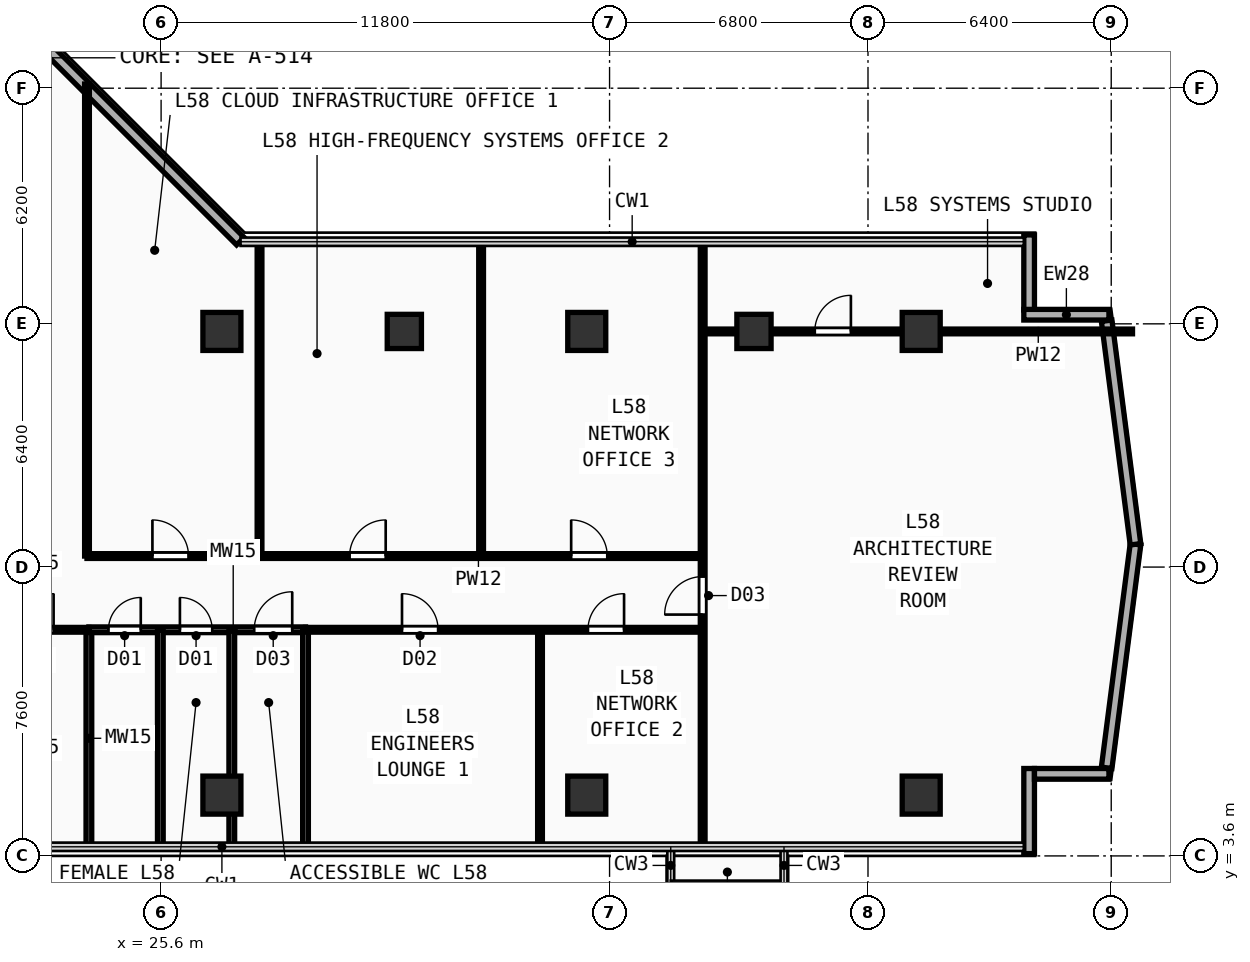
"""IFC4 building model, lengths in metres.
Left out: names, types, materials, properties, quantities, classifications, styles, units other than length and angle.
Written with IfcOpenShell. Run it as: python <this file> out.ifc"""

import sys

from ifc_helpers import new_model, si_unit, direction, frame, frame_2d, origin, origin_2d, place, context, subcontext, project, spatial, rectangle, extrude, element, fill, save


model = new_model("IFC4")
c1 = context("Model", 3, precision=1e-05, world=origin(), true_north=direction((0.0, 1.0)))
c2 = subcontext(c1, "Body", "Model", "MODEL_VIEW")
j1 = project(units=[si_unit("LENGTHUNIT", "METRE"), si_unit("PLANEANGLEUNIT", "RADIAN")], contexts=[c1])
p1 = place(None, origin())
s1 = spatial("IfcSite", under=j1, at=p1, CompositionType="ELEMENT")
p2 = place(p1, origin())
s2 = spatial("IfcBuilding", under=s1, at=p2, CompositionType="ELEMENT")
p3 = place(p2, frame((0.0, 0.0, 227.3)))
s3 = spatial("IfcBuildingStorey", under=s2, at=p3, CompositionType="ELEMENT", Elevation=227.3)
for number, where, z_axis, x_axis in (
    (1, (27.2, 5.2, 0.0), (0.0, 0.0, 1.0), (1.0, 0.0, 0.0)),
    (2, (36.8, 5.2, 0.0), (0.0, 0.0, 1.0), (1.0, 0.0, 0.0)),
    (3, (45.6, 5.2, 0.0), (0.0, 0.0, 1.0), (1.0, 0.0, 0.0)),
    (4, (27.2, 17.4, 0.0), (0.0, 0.0, 1.0), (1.0, 0.0, 0.0)),
    (5, (36.8, 17.4, 0.0), (0.0, 0.0, 1.0), (1.0, 0.0, 0.0)),
    (6, (45.6, 17.4, 0.0), (0.0, 0.0, 1.0), (1.0, 0.0, 0.0)),
):
    element("IfcColumn", number, at=place(p3, frame(where, z_axis=z_axis, x_axis=x_axis)), inside=s3, PredefinedType="COLUMN", context=c2, shape_type="SweptSolid", body=[
        extrude(rectangle(XDim=1.0, YDim=1.0, at=origin_2d()), origin(), (0.0, 0.0, 1.0), 3.56),
    ])
for number, where, z_axis, x_axis in (
    (7, (32.0, 17.4, 0.0), (0.0, 0.0, 1.0), (1.0, 0.0, 0.0)),
    (8, (41.2, 17.4, 0.0), (0.0, 0.0, 1.0), (1.0, 0.0, 0.0)),
):
    element("IfcColumn", number, at=place(p3, frame(where, z_axis=z_axis, x_axis=x_axis)), inside=s3, PredefinedType="COLUMN", context=c2, shape_type="SweptSolid", body=[
        extrude(rectangle(XDim=0.9, YDim=0.9, at=origin_2d()), origin(), (0.0, 0.0, 1.0), 3.56),
    ])
p4 = place(p3, frame((48.44, 3.66, 0.0), z_axis=(0.0, 0.0, 1.0), x_axis=(0.0, 1.0, 0.0)))
e9 = element("IfcWall", 9, at=p4, inside=s3, PredefinedType="SOLIDWALL", context=c2, shape_type="SweptSolid", body=[
    extrude(rectangle(XDim=2.24, YDim=0.28, at=frame_2d((1.12, 0.0))), origin(), (0.0, 0.0, 1.0), 3.56),
])
p5 = place(p3, frame((48.58, 5.76, 0.0), z_axis=(0.0, 0.0, 1.0), x_axis=(1.0, 0.0, 0.0)))
e10 = element("IfcWall", 10, at=p5, inside=s3, PredefinedType="SOLIDWALL", context=c2, shape_type="SweptSolid", body=[
    extrude(rectangle(XDim=1.96, YDim=0.28, at=frame_2d((0.98, 0.0))), origin(), (0.0, 0.0, 1.0), 3.56),
])
p6 = place(p3, frame((48.44, 17.965, 0.0), z_axis=(0.0, 0.0, 1.0), x_axis=(0.0, 1.0, 0.0)))
e11 = element("IfcWall", 11, at=p6, inside=s3, PredefinedType="SOLIDWALL", context=c2, shape_type="SweptSolid", body=[
    extrude(rectangle(XDim=1.975, YDim=0.28, at=frame_2d((0.987, 0.0))), origin(), (0.0, 0.0, 1.0), 3.56),
])
p7 = place(p3, frame((48.3, 17.84, 0.0), z_axis=(0.0, 0.0, 1.0), x_axis=(1.0, 0.0, 0.0)))
e12 = element("IfcWall", 12, at=p7, inside=s3, PredefinedType="SOLIDWALL", context=c2, shape_type="SweptSolid", body=[
    extrude(rectangle(XDim=2.24, YDim=0.28, at=frame_2d((1.12, 0.0))), origin(), (0.0, 0.0, 1.0), 3.56),
])
p8 = place(p3, frame((27.685, 19.775, 0.0), z_axis=(0.0, 0.0, 1.0), x_axis=(-0.707106781187, 0.707106781187, 0.0)))
e13 = element("IfcWall", 13, at=p8, inside=s3, PredefinedType="SOLIDWALL", context=c2, shape_type="SweptSolid", body=[
    extrude(rectangle(XDim=9.207, YDim=0.28, at=frame_2d((4.603, 0.0))), origin(), (0.0, 0.0, 1.0), 3.56),
])
for number, where, z_axis, x_axis in (
    (14, (50.48, 5.918, 0.0), (0.0, 0.0, 1.0), (0.128, 0.992, 0.0)),
    (15, (51.239, 11.799, 0.0), (0.0, 0.0, 1.0), (-0.128, 0.992, 0.0)),
):
    element("IfcWall", number, at=place(p3, frame(where, z_axis=z_axis, x_axis=x_axis)), inside=s3, PredefinedType="SOLIDWALL", context=c2, shape_type="SweptSolid", body=[
        extrude(rectangle(XDim=5.931, YDim=0.28, at=frame_2d((2.966, 0.0))), origin(), (0.0, 0.0, 1.0), 3.56),
    ])
p9 = place(p3, frame((23.7, 3.84, 0.0), z_axis=(0.0, 0.0, 1.0), x_axis=(0.0, 1.0, 0.0)))
e16 = element("IfcWall", 16, at=p9, inside=s3, PredefinedType="PLUMBINGWALL", context=c2, shape_type="SweptSolid", body=[
    extrude(rectangle(XDim=5.71, YDim=0.15, at=frame_2d((2.855, 0.0))), origin(), (0.0, 0.0, 1.0), 3.56),
])
p10 = place(p3, frame((23.7, 9.55, 0.0), z_axis=(0.0, 0.0, 1.0), x_axis=(1.0, 0.0, 0.0)))
e17 = element("IfcWall", 17, at=p10, inside=s3, PredefinedType="PLUMBINGWALL", context=c2, shape_type="SweptSolid", body=[
    extrude(rectangle(XDim=5.7, YDim=0.15, at=frame_2d((2.85, 0.0))), origin(), (0.0, 0.0, 1.0), 3.2),
])
p11 = place(p10, frame((0.515, 0.0, 0.0)))
e18 = element("IfcOpeningElement", 18, at=p11, cuts=e17, PredefinedType="OPENING", context=c2, shape_type="SweptSolid", body=[
    extrude(rectangle(XDim=0.85, YDim=2.15, at=frame_2d((0.425, 1.075))), frame((0.0, 0.085, 0.0), z_axis=(0.0, -1.0, 0.0), x_axis=(1.0, 0.0, 0.0)), (0.0, 0.0, 1.0), 0.17),
])
p12 = place(p10, frame((2.395, 0.0, 0.0)))
e19 = element("IfcOpeningElement", 19, at=p12, cuts=e17, PredefinedType="OPENING", context=c2, shape_type="SweptSolid", body=[
    extrude(rectangle(XDim=0.85, YDim=2.15, at=frame_2d((0.425, 1.075))), frame((0.0, 0.085, 0.0), z_axis=(0.0, -1.0, 0.0), x_axis=(1.0, 0.0, 0.0)), (0.0, 0.0, 1.0), 0.17),
])
p13 = place(p10, frame((4.35, 0.0, 0.0)))
e20 = element("IfcOpeningElement", 20, at=p13, cuts=e17, PredefinedType="OPENING", context=c2, shape_type="SweptSolid", body=[
    extrude(rectangle(XDim=1.0, YDim=2.2, at=frame_2d((0.5, 1.1))), frame((0.0, 0.085, 0.0), z_axis=(0.0, -1.0, 0.0), x_axis=(1.0, 0.0, 0.0)), (0.0, 0.0, 1.0), 0.17),
])
p14 = place(p3, frame((25.58, 3.84, 0.0), z_axis=(0.0, 0.0, 1.0), x_axis=(0.0, 1.0, 0.0)))
e21 = element("IfcWall", 21, at=p14, inside=s3, PredefinedType="PLUMBINGWALL", context=c2, shape_type="SweptSolid", body=[
    extrude(rectangle(XDim=5.71, YDim=0.15, at=frame_2d((2.855, 0.0))), origin(), (0.0, 0.0, 1.0), 3.56),
])
p15 = place(p3, frame((27.46, 3.84, 0.0), z_axis=(0.0, 0.0, 1.0), x_axis=(0.0, 1.0, 0.0)))
e22 = element("IfcWall", 22, at=p15, inside=s3, PredefinedType="PLUMBINGWALL", context=c2, shape_type="SweptSolid", body=[
    extrude(rectangle(XDim=5.71, YDim=0.15, at=frame_2d((2.855, 0.0))), origin(), (0.0, 0.0, 1.0), 3.16),
])
p16 = place(p3, frame((29.4, 3.84, 0.0), z_axis=(0.0, 0.0, 1.0), x_axis=(0.0, 1.0, 0.0)))
e23 = element("IfcWall", 23, at=p16, inside=s3, PredefinedType="PLUMBINGWALL", context=c2, shape_type="SweptSolid", body=[
    extrude(rectangle(XDim=5.71, YDim=0.15, at=frame_2d((2.855, 0.0))), origin(), (0.0, 0.0, 1.0), 3.56),
])
p17 = place(p3, frame((20.85, 9.55, 0.0), z_axis=(0.0, 0.0, 1.0), x_axis=(1.0, 0.0, 0.0)))
e24 = element("IfcWall", 24, at=p17, inside=s3, PredefinedType="PARTITIONING", context=c2, shape_type="SweptSolid", body=[
    extrude(rectangle(XDim=2.85, YDim=0.125, at=frame_2d((1.425, 0.0))), origin(), (0.0, 0.0, 1.0), 3.2),
])
p18 = place(p17, frame((0.971, 0.0, 0.0)))
e25 = element("IfcOpeningElement", 25, at=p18, cuts=e24, PredefinedType="OPENING", context=c2, shape_type="SweptSolid", body=[
    extrude(rectangle(XDim=0.95, YDim=2.15, at=frame_2d((0.475, 1.075))), frame((0.0, 0.073, 0.0), z_axis=(0.0, -1.0, 0.0), x_axis=(1.0, 0.0, 0.0)), (0.0, 0.0, 1.0), 0.145),
])
p19 = place(p3, frame((29.4, 9.55, 0.0), z_axis=(0.0, 0.0, 1.0), x_axis=(1.0, 0.0, 0.0)))
e26 = element("IfcWall", 26, at=p19, inside=s3, PredefinedType="PARTITIONING", context=c2, shape_type="SweptSolid", body=[
    extrude(rectangle(XDim=10.45, YDim=0.125, at=frame_2d((5.225, 0.0))), origin(), (0.0, 0.0, 1.0), 3.2),
])
p20 = place(p19, frame((2.539, 0.0, 0.0)))
e27 = element("IfcOpeningElement", 27, at=p20, cuts=e26, PredefinedType="OPENING", context=c2, shape_type="SweptSolid", body=[
    extrude(rectangle(XDim=0.95, YDim=2.15, at=frame_2d((0.475, 1.075))), frame((0.0, 0.073, 0.0), z_axis=(0.0, -1.0, 0.0), x_axis=(1.0, 0.0, 0.0)), (0.0, 0.0, 1.0), 0.145),
])
p21 = place(p19, frame((7.432, 0.0, 0.0)))
e28 = element("IfcOpeningElement", 28, at=p21, cuts=e26, PredefinedType="OPENING", context=c2, shape_type="SweptSolid", body=[
    extrude(rectangle(XDim=0.95, YDim=2.15, at=frame_2d((0.475, 1.075))), frame((0.0, 0.073, 0.0), z_axis=(0.0, -1.0, 0.0), x_axis=(1.0, 0.0, 0.0)), (0.0, 0.0, 1.0), 0.145),
])
p22 = place(p3, frame((35.57, 3.84, 0.0), z_axis=(0.0, 0.0, 1.0), x_axis=(0.0, 1.0, 0.0)))
e29 = element("IfcWall", 29, at=p22, inside=s3, PredefinedType="PARTITIONING", context=c2, shape_type="SweptSolid", body=[
    extrude(rectangle(XDim=5.71, YDim=0.125, at=frame_2d((2.855, 0.0))), origin(), (0.0, 0.0, 1.0), 3.56),
])
p23 = place(p3, frame((39.85, 3.84, 0.0), z_axis=(0.0, 0.0, 1.0), x_axis=(0.0, 1.0, 0.0)))
e30 = element("IfcWall", 30, at=p23, inside=s3, PredefinedType="PARTITIONING", context=c2, shape_type="SweptSolid", body=[
    extrude(rectangle(XDim=15.92, YDim=0.125, at=frame_2d((7.96, 0.0))), origin(), (0.0, 0.0, 1.0), 3.56),
])
p24 = place(p23, frame((6.11, 0.0, 0.0)))
e31 = element("IfcOpeningElement", 31, at=p24, cuts=e30, PredefinedType="OPENING", context=c2, shape_type="SweptSolid", body=[
    extrude(rectangle(XDim=1.0, YDim=2.2, at=frame_2d((0.5, 1.1))), frame((0.0, 0.073, 0.0), z_axis=(0.0, -1.0, 0.0), x_axis=(1.0, 0.0, 0.0)), (0.0, 0.0, 1.0), 0.145),
])
p25 = place(p3, frame((39.85, 17.4, 0.0), z_axis=(0.0, 0.0, 1.0), x_axis=(1.0, 0.0, 0.0)))
e32 = element("IfcWall", 32, at=p25, inside=s3, PredefinedType="PARTITIONING", context=c2, shape_type="SweptSolid", body=[
    extrude(rectangle(XDim=11.31, YDim=0.125, at=frame_2d((5.655, 0.0))), origin(), (0.0, 0.0, 1.0), 3.26),
])
p26 = place(p25, frame((2.95, 0.0, 0.0)))
e33 = element("IfcOpeningElement", 33, at=p26, cuts=e32, PredefinedType="OPENING", context=c2, shape_type="SweptSolid", body=[
    extrude(rectangle(XDim=0.95, YDim=2.15, at=frame_2d((0.475, 1.075))), frame((0.0, 0.073, 0.0), z_axis=(0.0, -1.0, 0.0), x_axis=(1.0, 0.0, 0.0)), (0.0, 0.0, 1.0), 0.145),
])
p27 = place(p3, frame((23.65, 11.49, 0.0), z_axis=(0.0, 0.0, 1.0), x_axis=(0.0, 1.0, 0.0)))
e34 = element("IfcWall", 34, at=p27, inside=s3, PredefinedType="PARTITIONING", context=c2, shape_type="SweptSolid", body=[
    extrude(rectangle(XDim=12.42, YDim=0.125, at=frame_2d((6.21, 0.0))), origin(), (0.0, 0.0, 1.0), 3.56),
])
p28 = place(p3, frame((23.65, 11.49, 0.0), z_axis=(0.0, 0.0, 1.0), x_axis=(1.0, 0.0, 0.0)))
e35 = element("IfcWall", 35, at=p28, inside=s3, PredefinedType="PARTITIONING", context=c2, shape_type="SweptSolid", body=[
    extrude(rectangle(XDim=16.2, YDim=0.125, at=frame_2d((8.1, 0.0))), origin(), (0.0, 0.0, 1.0), 3.56),
])
p29 = place(p28, frame((1.722, 0.0, 0.0)))
e36 = element("IfcOpeningElement", 36, at=p29, cuts=e35, PredefinedType="OPENING", context=c2, shape_type="SweptSolid", body=[
    extrude(rectangle(XDim=0.95, YDim=2.15, at=frame_2d((0.475, 1.075))), frame((0.0, 0.073, 0.0), z_axis=(0.0, -1.0, 0.0), x_axis=(1.0, 0.0, 0.0)), (0.0, 0.0, 1.0), 0.145),
])
p30 = place(p28, frame((6.91, 0.0, 0.0)))
e37 = element("IfcOpeningElement", 37, at=p30, cuts=e35, PredefinedType="OPENING", context=c2, shape_type="SweptSolid", body=[
    extrude(rectangle(XDim=0.95, YDim=2.15, at=frame_2d((0.475, 1.075))), frame((0.0, 0.073, 0.0), z_axis=(0.0, -1.0, 0.0), x_axis=(1.0, 0.0, 0.0)), (0.0, 0.0, 1.0), 0.145),
])
p31 = place(p28, frame((12.74, 0.0, 0.0)))
e38 = element("IfcOpeningElement", 38, at=p31, cuts=e35, PredefinedType="OPENING", context=c2, shape_type="SweptSolid", body=[
    extrude(rectangle(XDim=0.95, YDim=2.15, at=frame_2d((0.475, 1.075))), frame((0.0, 0.073, 0.0), z_axis=(0.0, -1.0, 0.0), x_axis=(1.0, 0.0, 0.0)), (0.0, 0.0, 1.0), 0.145),
])
for number, where, z_axis, x_axis in (
    (39, (28.19, 11.49, 0.0), (0.0, 0.0, 1.0), (0.0, 1.0, 0.0)),
    (40, (34.02, 11.49, 0.0), (0.0, 0.0, 1.0), (0.0, 1.0, 0.0)),
):
    element("IfcWall", number, at=place(p3, frame(where, z_axis=z_axis, x_axis=x_axis)), inside=s3, PredefinedType="PARTITIONING", context=c2, shape_type="SweptSolid", body=[
        extrude(rectangle(XDim=8.27, YDim=0.125, at=frame_2d((4.135, 0.0))), origin(), (0.0, 0.0, 1.0), 3.56),
    ])
p32 = place(p11, origin())
e41 = element("IfcDoor", 41, at=p32, inside=s3, OperationType="SINGLE_SWING_RIGHT", PredefinedType="DOOR", context=c2, shape_type="SweptSolid", body=[
    extrude(rectangle(XDim=0.85, YDim=2.15, at=frame_2d((0.425, 1.075))), frame((0.0, 0.025, 0.0), z_axis=(0.0, -1.0, 0.0), x_axis=(1.0, 0.0, 0.0)), (0.0, 0.0, 1.0), 0.05),
])
fill(e18, e41)
p33 = place(p12, origin())
e42 = element("IfcDoor", 42, at=p33, inside=s3, OperationType="SINGLE_SWING_LEFT", PredefinedType="DOOR", context=c2, shape_type="SweptSolid", body=[
    extrude(rectangle(XDim=0.85, YDim=2.15, at=frame_2d((0.425, 1.075))), frame((0.0, 0.025, 0.0), z_axis=(0.0, -1.0, 0.0), x_axis=(1.0, 0.0, 0.0)), (0.0, 0.0, 1.0), 0.05),
])
fill(e19, e42)
p34 = place(p13, origin())
e43 = element("IfcDoor", 43, at=p34, inside=s3, OperationType="SINGLE_SWING_RIGHT", PredefinedType="DOOR", context=c2, shape_type="SweptSolid", body=[
    extrude(rectangle(XDim=1.0, YDim=2.2, at=frame_2d((0.5, 1.1))), frame((0.0, 0.025, 0.0), z_axis=(0.0, -1.0, 0.0), x_axis=(1.0, 0.0, 0.0)), (0.0, 0.0, 1.0), 0.05),
])
fill(e20, e43)
p35 = place(p18, origin())
e44 = element("IfcDoor", 44, at=p35, inside=s3, OperationType="SINGLE_SWING_RIGHT", PredefinedType="DOOR", context=c2, shape_type="SweptSolid", body=[
    extrude(rectangle(XDim=0.95, YDim=2.15, at=frame_2d((0.475, 1.075))), frame((0.0, 0.025, 0.0), z_axis=(0.0, -1.0, 0.0), x_axis=(1.0, 0.0, 0.0)), (0.0, 0.0, 1.0), 0.05),
])
fill(e25, e44)
p36 = place(p20, origin())
e45 = element("IfcDoor", 45, at=p36, inside=s3, OperationType="SINGLE_SWING_LEFT", PredefinedType="DOOR", context=c2, shape_type="SweptSolid", body=[
    extrude(rectangle(XDim=0.95, YDim=2.15, at=frame_2d((0.475, 1.075))), frame((0.0, 0.025, 0.0), z_axis=(0.0, -1.0, 0.0), x_axis=(1.0, 0.0, 0.0)), (0.0, 0.0, 1.0), 0.05),
])
fill(e27, e45)
p37 = place(p21, origin())
e46 = element("IfcDoor", 46, at=p37, inside=s3, OperationType="SINGLE_SWING_RIGHT", PredefinedType="DOOR", context=c2, shape_type="SweptSolid", body=[
    extrude(rectangle(XDim=0.95, YDim=2.15, at=frame_2d((0.475, 1.075))), frame((0.0, 0.025, 0.0), z_axis=(0.0, -1.0, 0.0), x_axis=(1.0, 0.0, 0.0)), (0.0, 0.0, 1.0), 0.05),
])
fill(e28, e46)
p38 = place(p24, origin())
e47 = element("IfcDoor", 47, at=p38, inside=s3, OperationType="SINGLE_SWING_LEFT", PredefinedType="DOOR", context=c2, shape_type="SweptSolid", body=[
    extrude(rectangle(XDim=1.0, YDim=2.2, at=frame_2d((0.5, 1.1))), frame((0.0, 0.025, 0.0), z_axis=(0.0, -1.0, 0.0), x_axis=(1.0, 0.0, 0.0)), (0.0, 0.0, 1.0), 0.05),
])
fill(e31, e47)
p39 = place(p26, origin())
e48 = element("IfcDoor", 48, at=p39, inside=s3, OperationType="SINGLE_SWING_RIGHT", PredefinedType="DOOR", context=c2, shape_type="SweptSolid", body=[
    extrude(rectangle(XDim=0.95, YDim=2.15, at=frame_2d((0.475, 1.075))), frame((0.0, 0.025, 0.0), z_axis=(0.0, -1.0, 0.0), x_axis=(1.0, 0.0, 0.0)), (0.0, 0.0, 1.0), 0.05),
])
fill(e33, e48)
p40 = place(p29, origin())
e49 = element("IfcDoor", 49, at=p40, inside=s3, OperationType="SINGLE_SWING_LEFT", PredefinedType="DOOR", context=c2, shape_type="SweptSolid", body=[
    extrude(rectangle(XDim=0.95, YDim=2.15, at=frame_2d((0.475, 1.075))), frame((0.0, 0.025, 0.0), z_axis=(0.0, -1.0, 0.0), x_axis=(1.0, 0.0, 0.0)), (0.0, 0.0, 1.0), 0.05),
])
fill(e36, e49)
p41 = place(p30, origin())
e50 = element("IfcDoor", 50, at=p41, inside=s3, OperationType="SINGLE_SWING_RIGHT", PredefinedType="DOOR", context=c2, shape_type="SweptSolid", body=[
    extrude(rectangle(XDim=0.95, YDim=2.15, at=frame_2d((0.475, 1.075))), frame((0.0, 0.025, 0.0), z_axis=(0.0, -1.0, 0.0), x_axis=(1.0, 0.0, 0.0)), (0.0, 0.0, 1.0), 0.05),
])
fill(e37, e50)
p42 = place(p31, origin())
e51 = element("IfcDoor", 51, at=p42, inside=s3, OperationType="SINGLE_SWING_LEFT", PredefinedType="DOOR", context=c2, shape_type="SweptSolid", body=[
    extrude(rectangle(XDim=0.95, YDim=2.15, at=frame_2d((0.475, 1.075))), frame((0.0, 0.025, 0.0), z_axis=(0.0, -1.0, 0.0), x_axis=(1.0, 0.0, 0.0)), (0.0, 0.0, 1.0), 0.05),
])
fill(e38, e51)
save(model, sys.argv[1])
